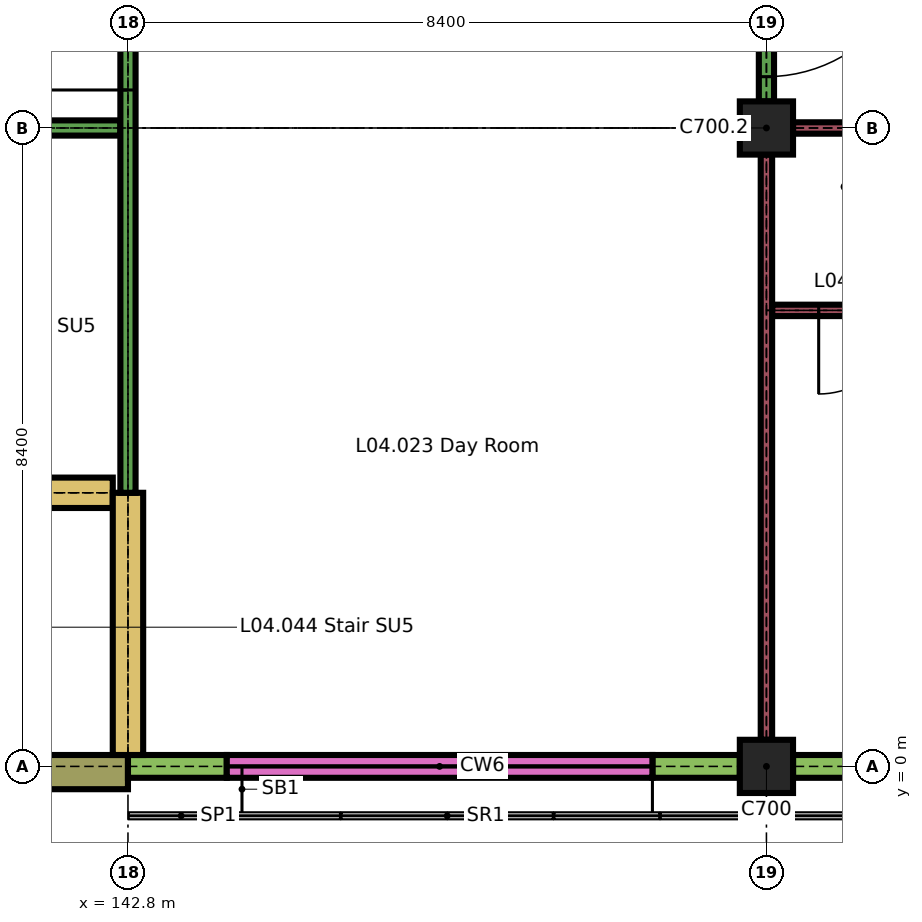
"""IFC4 building model, lengths in metres.
Left out: names, types, materials, properties, quantities, classifications, styles, units other than length and angle.
Written with IfcOpenShell. Run it as: python <this file> out.ifc"""

import sys

from ifc_helpers import new_model, si_unit, direction, frame, frame_2d, origin, origin_2d, place, context, subcontext, project, spatial, rectangle, extrude, element, fill, save


model = new_model("IFC4")
c1 = context("Model", 3, precision=1e-05, world=origin(), true_north=direction((0.0, 1.0)))
c2 = subcontext(c1, "Body", "Model", "MODEL_VIEW")
j1 = project(units=[si_unit("LENGTHUNIT", "METRE"), si_unit("PLANEANGLEUNIT", "RADIAN")], contexts=[c1])
p1 = place(None, origin())
s1 = spatial("IfcSite", under=j1, at=p1, CompositionType="ELEMENT")
p2 = place(p1, origin())
s2 = spatial("IfcBuilding", under=s1, at=p2, CompositionType="ELEMENT")
p3 = place(p2, frame((0.0, 0.0, 18.9)))
s3 = spatial("IfcBuildingStorey", under=s2, at=p3, CompositionType="ELEMENT", Elevation=18.9)
for number, where, z_axis, x_axis in (
    (1, (151.2, 0.0, 0.0), (0.0, 0.0, 1.0), (1.0, 0.0, 0.0)),
    (2, (151.2, 8.4, 0.0), (0.0, 0.0, 1.0), (1.0, 0.0, 0.0)),
):
    element("IfcColumn", number, at=place(p3, frame(where, z_axis=z_axis, x_axis=x_axis)), inside=s3, PredefinedType="COLUMN", context=c2, shape_type="SweptSolid", body=[
        extrude(rectangle(XDim=0.7, YDim=0.7, at=origin_2d()), origin(), (0.0, 0.0, 1.0), 3.26),
    ])
p4 = place(p3, frame((138.95, -0.075, 0.0), z_axis=(0.0, 0.0, 1.0), x_axis=(1.0, 0.0, 0.0)))
e3 = element("IfcWall", 3, at=p4, inside=s3, PredefinedType="SOLIDWALL", context=c2, shape_type="SweptSolid", body=[
    extrude(rectangle(XDim=3.85, YDim=0.45, at=frame_2d((1.925, 0.0))), origin(), (0.0, 0.0, 1.0), 3.26),
])
p5 = place(p3, frame((142.8, 0.0, 0.0), z_axis=(0.0, 0.0, 1.0), x_axis=(1.0, 0.0, 0.0)))
e4 = element("IfcWall", 4, at=p5, inside=s3, PredefinedType="SOLIDWALL", context=c2, shape_type="SweptSolid", body=[
    extrude(rectangle(XDim=1.3, YDim=0.3, at=frame_2d((0.65, 0.0))), origin(), (0.0, 0.0, 1.0), 2.96),
])
p6 = place(p3, frame((149.7, 0.0, 0.0), z_axis=(0.0, 0.0, 1.0), x_axis=(1.0, 0.0, 0.0)))
e5 = element("IfcWall", 5, at=p6, inside=s3, PredefinedType="SOLIDWALL", context=c2, shape_type="SweptSolid", body=[
    extrude(rectangle(XDim=1.15, YDim=0.3, at=frame_2d((0.575, 0.0))), origin(), (0.0, 0.0, 1.0), 2.96),
])
p7 = place(p3, frame((144.1, 0.0, 0.0), z_axis=(0.0, 0.0, 1.0), x_axis=(1.0, 0.0, 0.0)))
e6 = element("IfcWall", 6, at=p7, inside=s3, PredefinedType="SOLIDWALL", context=c2, shape_type="SweptSolid", body=[
    extrude(rectangle(XDim=5.6, YDim=0.3, at=frame_2d((2.8, 0.0))), origin(), (0.0, 0.0, 1.0), 0.6),
])
p8 = place(p3, frame((151.55, 0.0, 0.0), z_axis=(0.0, 0.0, 1.0), x_axis=(1.0, 0.0, 0.0)))
e7 = element("IfcWall", 7, at=p8, inside=s3, PredefinedType="SOLIDWALL", context=c2, shape_type="SweptSolid", body=[
    extrude(rectangle(XDim=3.85, YDim=0.3, at=frame_2d((1.925, 0.0))), origin(), (0.0, 0.0, 1.0), 2.96),
])
p9 = place(p8, frame((0.7, 0.0, 0.9)))
e8 = element("IfcOpeningElement", 8, at=p9, cuts=e7, PredefinedType="OPENING", context=c2, shape_type="SweptSolid", body=[
    extrude(rectangle(XDim=2.1, YDim=1.5, at=frame_2d((1.05, 0.75))), frame((0.0, 0.16, 0.0), z_axis=(0.0, -1.0, 0.0), x_axis=(1.0, 0.0, 0.0)), (0.0, 0.0, 1.0), 0.32),
])
p10 = place(p3, frame((134.6, 3.6, 0.0), z_axis=(0.0, 0.0, 1.0), x_axis=(1.0, 0.0, 0.0)))
e9 = element("IfcWall", 9, at=p10, inside=s3, PredefinedType="SHEAR", context=c2, shape_type="SweptSolid", body=[
    extrude(rectangle(XDim=8.0, YDim=0.4, at=frame_2d((4.0, 0.0))), origin(), (0.0, 0.0, 1.0), 3.26),
])
p11 = place(p10, frame((0.4, 0.0, 0.0)))
e10 = element("IfcOpeningElement", 10, at=p11, cuts=e9, PredefinedType="OPENING", context=c2, shape_type="SweptSolid", body=[
    extrude(rectangle(XDim=1.2, YDim=2.1, at=frame_2d((0.6, 1.05))), frame((0.0, 0.21, 0.0), z_axis=(0.0, -1.0, 0.0), x_axis=(1.0, 0.0, 0.0)), (0.0, 0.0, 1.0), 0.42),
])
p12 = place(p3, frame((151.275, 6.0, 0.0), z_axis=(0.0, 0.0, 1.0), x_axis=(1.0, 0.0, 0.0)))
e11 = element("IfcWall", 11, at=p12, inside=s3, PredefinedType="PARTITIONING", context=c2, shape_type="SweptSolid", body=[
    extrude(rectangle(XDim=4.05, YDim=0.15, at=frame_2d((2.025, 0.0))), origin(), (0.0, 0.0, 1.0), 3.26),
])
p13 = place(p12, frame((0.613, 0.0, 0.0)))
e12 = element("IfcOpeningElement", 12, at=p13, cuts=e11, PredefinedType="OPENING", context=c2, shape_type="SweptSolid", body=[
    extrude(rectangle(XDim=1.1, YDim=2.1, at=frame_2d((0.55, 1.05))), frame((0.0, 0.085, 0.0), z_axis=(0.0, -1.0, 0.0), x_axis=(1.0, 0.0, 0.0)), (0.0, 0.0, 1.0), 0.17),
])
p14 = place(p12, frame((2.587, 0.0, 0.0)))
e13 = element("IfcOpeningElement", 13, at=p14, cuts=e11, PredefinedType="OPENING", context=c2, shape_type="SweptSolid", body=[
    extrude(rectangle(XDim=1.2, YDim=2.1, at=frame_2d((0.6, 1.05))), frame((0.0, 0.085, 0.0), z_axis=(0.0, -1.0, 0.0), x_axis=(1.0, 0.0, 0.0)), (0.0, 0.0, 1.0), 0.17),
])
p15 = place(p3, frame((134.5, 8.4, 0.0), z_axis=(0.0, 0.0, 1.0), x_axis=(1.0, 0.0, 0.0)))
e14 = element("IfcWall", 14, at=p15, inside=s3, PredefinedType="PARTITIONING", context=c2, shape_type="SweptSolid", body=[
    extrude(rectangle(XDim=8.2, YDim=0.2, at=frame_2d((4.1, 0.0))), origin(), (0.0, 0.0, 1.0), 3.26),
])
p16 = place(p15, frame((3.1, 0.0, 0.0)))
e15 = element("IfcOpeningElement", 15, at=p16, cuts=e14, PredefinedType="OPENING", context=c2, shape_type="SweptSolid", body=[
    extrude(rectangle(XDim=2.0, YDim=2.4, at=frame_2d((1.0, 1.2))), frame((0.0, 0.11, 0.0), z_axis=(0.0, -1.0, 0.0), x_axis=(1.0, 0.0, 0.0)), (0.0, 0.0, 1.0), 0.22),
])
p17 = place(p3, frame((151.55, 8.4, 0.0), z_axis=(0.0, 0.0, 1.0), x_axis=(1.0, 0.0, 0.0)))
e16 = element("IfcWall", 16, at=p17, inside=s3, PredefinedType="PARTITIONING", context=c2, shape_type="SweptSolid", body=[
    extrude(rectangle(XDim=7.7, YDim=0.15, at=frame_2d((3.85, 0.0))), origin(), (0.0, 0.0, 1.0), 3.26),
])
p18 = place(p17, frame((2.35, 0.0, 0.0)))
e17 = element("IfcOpeningElement", 17, at=p18, cuts=e16, PredefinedType="OPENING", context=c2, shape_type="SweptSolid", body=[
    extrude(rectangle(XDim=1.2, YDim=2.1, at=frame_2d((0.6, 1.05))), frame((0.0, 0.085, 0.0), z_axis=(0.0, -1.0, 0.0), x_axis=(1.0, 0.0, 0.0)), (0.0, 0.0, 1.0), 0.17),
])
p19 = place(p17, frame((4.1, 0.0, 0.0)))
e18 = element("IfcOpeningElement", 18, at=p19, cuts=e16, PredefinedType="OPENING", context=c2, shape_type="SweptSolid", body=[
    extrude(rectangle(XDim=1.5, YDim=2.4, at=frame_2d((0.75, 1.2))), frame((0.0, 0.085, 0.0), z_axis=(0.0, -1.0, 0.0), x_axis=(1.0, 0.0, 0.0)), (0.0, 0.0, 1.0), 0.17),
])
p20 = place(p3, frame((142.8, 0.15, 0.0), z_axis=(0.0, 0.0, 1.0), x_axis=(0.0, 1.0, 0.0)))
e19 = element("IfcWall", 19, at=p20, inside=s3, PredefinedType="SHEAR", context=c2, shape_type="SweptSolid", body=[
    extrude(rectangle(XDim=3.45, YDim=0.4, at=frame_2d((1.725, 0.0))), origin(), (0.0, 0.0, 1.0), 3.26),
])
p21 = place(p3, frame((142.8, 3.6, 0.0), z_axis=(0.0, 0.0, 1.0), x_axis=(0.0, 1.0, 0.0)))
e20 = element("IfcWall", 20, at=p21, inside=s3, PredefinedType="PARTITIONING", context=c2, shape_type="SweptSolid", body=[
    extrude(rectangle(XDim=18.0, YDim=0.2, at=frame_2d((9.0, 0.0))), origin(), (0.0, 0.0, 1.0), 3.26),
])
p22 = place(p21, frame((5.3, 0.0, 0.0)))
e21 = element("IfcOpeningElement", 21, at=p22, cuts=e20, PredefinedType="OPENING", context=c2, shape_type="SweptSolid", body=[
    extrude(rectangle(XDim=2.0, YDim=2.4, at=frame_2d((1.0, 1.2))), frame((0.0, 0.11, 0.0), z_axis=(0.0, -1.0, 0.0), x_axis=(1.0, 0.0, 0.0)), (0.0, 0.0, 1.0), 0.22),
])
p23 = place(p21, frame((10.7, 0.0, 0.0)))
e22 = element("IfcOpeningElement", 22, at=p23, cuts=e20, PredefinedType="OPENING", context=c2, shape_type="SweptSolid", body=[
    extrude(rectangle(XDim=2.0, YDim=2.4, at=frame_2d((1.0, 1.2))), frame((0.0, 0.11, 0.0), z_axis=(0.0, -1.0, 0.0), x_axis=(1.0, 0.0, 0.0)), (0.0, 0.0, 1.0), 0.22),
])
p24 = place(p3, frame((151.2, 0.35, 0.0), z_axis=(0.0, 0.0, 1.0), x_axis=(0.0, 1.0, 0.0)))
e23 = element("IfcWall", 23, at=p24, inside=s3, PredefinedType="PARTITIONING", context=c2, shape_type="SweptSolid", body=[
    extrude(rectangle(XDim=7.7, YDim=0.15, at=frame_2d((3.85, 0.0))), origin(), (0.0, 0.0, 1.0), 3.26),
])
p25 = place(p3, frame((151.2, 8.75, 0.0), z_axis=(0.0, 0.0, 1.0), x_axis=(0.0, 1.0, 0.0)))
e24 = element("IfcWall", 24, at=p25, inside=s3, PredefinedType="PARTITIONING", context=c2, shape_type="SweptSolid", body=[
    extrude(rectangle(XDim=7.7, YDim=0.2, at=frame_2d((3.85, 0.0))), origin(), (0.0, 0.0, 1.0), 3.26),
])
p26 = place(p25, frame((0.325, 0.0, 0.0)))
e25 = element("IfcOpeningElement", 25, at=p26, cuts=e24, PredefinedType="OPENING", context=c2, shape_type="SweptSolid", body=[
    extrude(rectangle(XDim=2.0, YDim=2.4, at=frame_2d((1.0, 1.2))), frame((0.0, 0.11, 0.0), z_axis=(0.0, -1.0, 0.0), x_axis=(1.0, 0.0, 0.0)), (0.0, 0.0, 1.0), 0.22),
])
p27 = place(p25, frame((5.375, 0.0, 0.0)))
e26 = element("IfcOpeningElement", 26, at=p27, cuts=e24, PredefinedType="OPENING", context=c2, shape_type="SweptSolid", body=[
    extrude(rectangle(XDim=2.0, YDim=2.4, at=frame_2d((1.0, 1.2))), frame((0.0, 0.11, 0.0), z_axis=(0.0, -1.0, 0.0), x_axis=(1.0, 0.0, 0.0)), (0.0, 0.0, 1.0), 0.22),
])
p28 = place(p13, origin())
e27 = element("IfcDoor", 27, at=p28, inside=s3, OperationType="SINGLE_SWING_LEFT", PredefinedType="DOOR", context=c2, shape_type="SweptSolid", body=[
    extrude(rectangle(XDim=1.1, YDim=2.1, at=frame_2d((0.55, 1.05))), frame((0.0, 0.025, 0.0), z_axis=(0.0, -1.0, 0.0), x_axis=(1.0, 0.0, 0.0)), (0.0, 0.0, 1.0), 0.05),
])
fill(e12, e27)
p29 = place(p22, origin())
e28 = element("IfcDoor", 28, at=p29, inside=s3, OperationType="SINGLE_SWING_RIGHT", PredefinedType="DOOR", context=c2, shape_type="SweptSolid", body=[
    extrude(rectangle(XDim=2.0, YDim=2.4, at=frame_2d((1.0, 1.2))), frame((0.0, 0.03, 0.0), z_axis=(0.0, -1.0, 0.0), x_axis=(1.0, 0.0, 0.0)), (0.0, 0.0, 1.0), 0.06),
])
fill(e21, e28)
p30 = place(p26, origin())
e29 = element("IfcDoor", 29, at=p30, inside=s3, OperationType="SINGLE_SWING_RIGHT", PredefinedType="DOOR", context=c2, shape_type="SweptSolid", body=[
    extrude(rectangle(XDim=2.0, YDim=2.4, at=frame_2d((1.0, 1.2))), frame((0.0, 0.03, 0.0), z_axis=(0.0, -1.0, 0.0), x_axis=(1.0, 0.0, 0.0)), (0.0, 0.0, 1.0), 0.06),
])
fill(e25, e29)
save(model, sys.argv[1])
